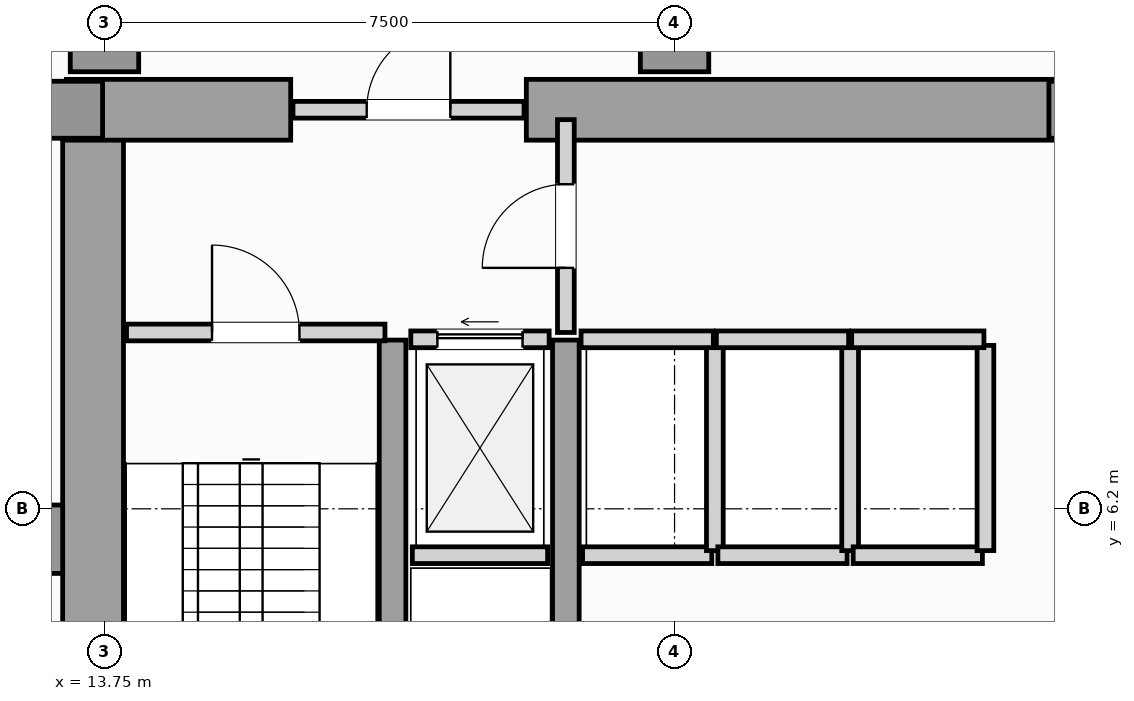
"""IFC4 building model, lengths in metres.
Left out: names, types, materials, properties, quantities, classifications, styles, units other than length and angle.
Written with IfcOpenShell. Run it as: python <this file> out.ifc"""

import sys

from ifc_helpers import new_model, si_unit, direction, frame, frame_2d, origin, origin_2d, place, context, subcontext, project, spatial, rectangle, extrude, element, fill, save


model = new_model("IFC4")
c1 = context("Model", 3, precision=1e-05, world=origin(), true_north=direction((0.0, 1.0)))
c2 = subcontext(c1, "Body", "Model", "MODEL_VIEW")
j1 = project(units=[si_unit("LENGTHUNIT", "METRE"), si_unit("PLANEANGLEUNIT", "RADIAN")], contexts=[c1])
p1 = place(None, origin())
s1 = spatial("IfcSite", under=j1, at=p1, CompositionType="ELEMENT")
p2 = place(p1, origin())
s2 = spatial("IfcBuilding", under=s1, at=p2, CompositionType="ELEMENT")
p3 = place(p2, frame((0.0, 0.0, 15.0)))
s3 = spatial("IfcBuildingStorey", under=s2, at=p3, CompositionType="ELEMENT", Elevation=15.0)
p4 = place(p3, frame((13.6, 0.92, 0.0), z_axis=(0.0, 0.0, 1.0), x_axis=(0.0, 1.0, 0.0)))
e1 = element("IfcWall", 1, at=p4, inside=s3, PredefinedType="SHEAR", context=c2, shape_type="SweptSolid", body=[
    extrude(rectangle(XDim=10.53, YDim=0.8, at=frame_2d((5.265, 0.0))), origin(), (0.0, 0.0, 1.0), 4.5),
])
p5 = place(p3, frame((13.25, 11.45, 0.0), z_axis=(0.0, 0.0, 1.0), x_axis=(1.0, 0.0, 0.0)))
e2 = element("IfcWall", 2, at=p5, inside=s3, PredefinedType="SHEAR", context=c2, shape_type="SweptSolid", body=[
    extrude(rectangle(XDim=2.95, YDim=0.8, at=frame_2d((1.475, 0.0))), origin(), (0.0, 0.0, 1.0), 4.5),
])
p6 = place(p3, frame((19.3, 11.45, 0.0), z_axis=(0.0, 0.0, 1.0), x_axis=(1.0, 0.0, 0.0)))
e3 = element("IfcWall", 3, at=p6, inside=s3, PredefinedType="SHEAR", context=c2, shape_type="SweptSolid", body=[
    extrude(rectangle(XDim=7.3, YDim=0.8, at=frame_2d((3.65, 0.0))), origin(), (0.0, 0.0, 1.0), 4.5),
])
for number, where, z_axis, x_axis in (
    (4, (17.54, 0.92, 0.0), (0.0, 0.0, 1.0), (0.0, 1.0, 0.0)),
    (5, (19.82, 0.92, 0.0), (0.0, 0.0, 1.0), (0.0, 1.0, 0.0)),
):
    element("IfcWall", number, at=place(p3, frame(where, z_axis=z_axis, x_axis=x_axis)), inside=s3, PredefinedType="SHEAR", context=c2, shape_type="SweptSolid", body=[
        extrude(rectangle(XDim=7.5, YDim=0.35, at=frame_2d((3.75, 0.0))), origin(), (0.0, 0.0, 1.0), 4.5),
    ])
p7 = place(p3, frame((12.9, 5.8, 0.0), z_axis=(0.0, 0.0, 1.0), x_axis=(1.0, 0.0, 0.0)))
e6 = element("IfcColumn", 6, at=p7, inside=s3, PredefinedType="PILASTER", context=c2, shape_type="SweptSolid", body=[
    extrude(rectangle(XDim=0.6, YDim=0.9, at=origin_2d()), origin(), (0.0, 0.0, 1.0), 4.8),
])
for number, where, z_axis, x_axis in (
    (7, (13.35, 11.45, 0.0), (0.0, 0.0, 1.0), (1.0, 0.0, 0.0)),
    (8, (26.55, 11.45, 0.0), (0.0, 0.0, 1.0), (1.0, 0.0, 0.0)),
):
    element("IfcColumn", number, at=place(p3, frame(where, z_axis=z_axis, x_axis=x_axis)), inside=s3, PredefinedType="COLUMN", context=c2, shape_type="SweptSolid", body=[
        extrude(rectangle(XDim=0.75, YDim=0.75, at=origin_2d()), origin(), (0.0, 0.0, 1.0), 4.8),
    ])
for number, where, z_axis, x_axis in (
    (9, (13.75, 12.4, 0.0), (0.0, 0.0, 1.0), (1.0, 0.0, 0.0)),
    (10, (21.25, 12.4, 0.0), (0.0, 0.0, 1.0), (1.0, 0.0, 0.0)),
):
    element("IfcColumn", number, at=place(p3, frame(where, z_axis=z_axis, x_axis=x_axis)), inside=s3, PredefinedType="COLUMN", context=c2, shape_type="SweptSolid", body=[
        extrude(rectangle(XDim=0.9, YDim=0.9, at=origin_2d()), origin(), (0.0, 0.0, 1.0), 4.8),
    ])
p8 = place(p3, frame((17.8, 5.59, 0.0), z_axis=(0.0, 0.0, 1.0), x_axis=(1.0, 0.0, 0.0)))
e11 = element("IfcWall", 11, at=p8, inside=s3, PredefinedType="SOLIDWALL", context=c2, shape_type="SweptSolid", body=[
    extrude(rectangle(XDim=1.78, YDim=0.22, at=frame_2d((0.89, 0.0))), origin(), (0.0, 0.0, 1.0), 4.5),
])
p9 = place(p3, frame((17.78, 8.43, 0.0), z_axis=(0.0, 0.0, 1.0), x_axis=(1.0, 0.0, 0.0)))
e12 = element("IfcWall", 12, at=p9, inside=s3, PredefinedType="SOLIDWALL", context=c2, shape_type="SweptSolid", body=[
    extrude(rectangle(XDim=1.82, YDim=0.22, at=frame_2d((0.91, 0.0))), origin(), (0.0, 0.0, 1.0), 4.5),
])
p10 = place(p9, frame((0.35, 0.0, 0.0)))
e13 = element("IfcOpeningElement", 13, at=p10, cuts=e12, PredefinedType="OPENING", context=c2, shape_type="SweptSolid", body=[
    extrude(rectangle(XDim=1.12, YDim=2.25, at=frame_2d((0.56, 1.125))), frame((0.0, 0.12, 0.0), z_axis=(0.0, -1.0, 0.0), x_axis=(1.0, 0.0, 0.0)), (0.0, 0.0, 1.0), 0.24),
])
p11 = place(p3, frame((20.04, 5.59, 0.0), z_axis=(0.0, 0.0, 1.0), x_axis=(1.0, 0.0, 0.0)))
e14 = element("IfcWall", 14, at=p11, inside=s3, PredefinedType="SOLIDWALL", context=c2, shape_type="SweptSolid", body=[
    extrude(rectangle(XDim=1.7, YDim=0.22, at=frame_2d((0.85, 0.0))), origin(), (0.0, 0.0, 1.0), 4.5),
])
p12 = place(p3, frame((21.78, 5.65, 0.0), z_axis=(0.0, 0.0, 1.0), x_axis=(0.0, 1.0, 0.0)))
e15 = element("IfcWall", 15, at=p12, inside=s3, PredefinedType="SOLIDWALL", context=c2, shape_type="SweptSolid", body=[
    extrude(rectangle(XDim=2.7, YDim=0.22, at=frame_2d((1.35, 0.0))), origin(), (0.0, 0.0, 1.0), 4.5),
])
p13 = place(p3, frame((20.02, 8.43, 0.0), z_axis=(0.0, 0.0, 1.0), x_axis=(1.0, 0.0, 0.0)))
e16 = element("IfcWall", 16, at=p13, inside=s3, PredefinedType="SOLIDWALL", context=c2, shape_type="SweptSolid", body=[
    extrude(rectangle(XDim=1.74, YDim=0.22, at=frame_2d((0.87, 0.0))), origin(), (0.0, 0.0, 1.0), 4.5),
])
p14 = place(p3, frame((21.82, 5.59, 0.0), z_axis=(0.0, 0.0, 1.0), x_axis=(1.0, 0.0, 0.0)))
e17 = element("IfcWall", 17, at=p14, inside=s3, PredefinedType="SOLIDWALL", context=c2, shape_type="SweptSolid", body=[
    extrude(rectangle(XDim=1.7, YDim=0.22, at=frame_2d((0.85, 0.0))), origin(), (0.0, 0.0, 1.0), 4.5),
])
p15 = place(p3, frame((23.56, 5.65, 0.0), z_axis=(0.0, 0.0, 1.0), x_axis=(0.0, 1.0, 0.0)))
e18 = element("IfcWall", 18, at=p15, inside=s3, PredefinedType="SOLIDWALL", context=c2, shape_type="SweptSolid", body=[
    extrude(rectangle(XDim=2.7, YDim=0.22, at=frame_2d((1.35, 0.0))), origin(), (0.0, 0.0, 1.0), 4.5),
])
p16 = place(p3, frame((21.8, 8.43, 0.0), z_axis=(0.0, 0.0, 1.0), x_axis=(1.0, 0.0, 0.0)))
e19 = element("IfcWall", 19, at=p16, inside=s3, PredefinedType="SOLIDWALL", context=c2, shape_type="SweptSolid", body=[
    extrude(rectangle(XDim=1.74, YDim=0.22, at=frame_2d((0.87, 0.0))), origin(), (0.0, 0.0, 1.0), 4.5),
])
p17 = place(p3, frame((23.6, 5.59, 0.0), z_axis=(0.0, 0.0, 1.0), x_axis=(1.0, 0.0, 0.0)))
e20 = element("IfcWall", 20, at=p17, inside=s3, PredefinedType="SOLIDWALL", context=c2, shape_type="SweptSolid", body=[
    extrude(rectangle(XDim=1.7, YDim=0.22, at=frame_2d((0.85, 0.0))), origin(), (0.0, 0.0, 1.0), 4.5),
])
p18 = place(p3, frame((25.34, 5.65, 0.0), z_axis=(0.0, 0.0, 1.0), x_axis=(0.0, 1.0, 0.0)))
e21 = element("IfcWall", 21, at=p18, inside=s3, PredefinedType="SOLIDWALL", context=c2, shape_type="SweptSolid", body=[
    extrude(rectangle(XDim=2.7, YDim=0.22, at=frame_2d((1.35, 0.0))), origin(), (0.0, 0.0, 1.0), 4.5),
])
p19 = place(p3, frame((23.58, 8.43, 0.0), z_axis=(0.0, 0.0, 1.0), x_axis=(1.0, 0.0, 0.0)))
e22 = element("IfcWall", 22, at=p19, inside=s3, PredefinedType="SOLIDWALL", context=c2, shape_type="SweptSolid", body=[
    extrude(rectangle(XDim=1.74, YDim=0.22, at=frame_2d((0.87, 0.0))), origin(), (0.0, 0.0, 1.0), 4.5),
])
p20 = place(p3, frame((14.04, 8.52, 0.0), z_axis=(0.0, 0.0, 1.0), x_axis=(1.0, 0.0, 0.0)))
e23 = element("IfcWall", 23, at=p20, inside=s3, PredefinedType="SOLIDWALL", context=c2, shape_type="SweptSolid", body=[
    extrude(rectangle(XDim=3.4, YDim=0.22, at=frame_2d((1.7, 0.0))), origin(), (0.0, 0.0, 1.0), 4.5),
])
p21 = place(p20, frame((1.125, 0.0, 0.0)))
e24 = element("IfcOpeningElement", 24, at=p21, cuts=e23, PredefinedType="OPENING", context=c2, shape_type="SweptSolid", body=[
    extrude(rectangle(XDim=1.15, YDim=2.2, at=frame_2d((0.575, 1.1))), frame((0.0, 0.12, 0.0), z_axis=(0.0, -1.0, 0.0), x_axis=(1.0, 0.0, 0.0)), (0.0, 0.0, 1.0), 0.24),
])
p22 = place(p3, frame((19.82, 8.52, 0.0), z_axis=(0.0, 0.0, 1.0), x_axis=(0.0, 1.0, 0.0)))
e25 = element("IfcWall", 25, at=p22, inside=s3, PredefinedType="SOLIDWALL", context=c2, shape_type="SweptSolid", body=[
    extrude(rectangle(XDim=2.8, YDim=0.22, at=frame_2d((1.4, 0.0))), origin(), (0.0, 0.0, 1.0), 3.956),
])
p23 = place(p22, frame((0.85, 0.0, 0.0)))
e26 = element("IfcOpeningElement", 26, at=p23, cuts=e25, PredefinedType="OPENING", context=c2, shape_type="SweptSolid", body=[
    extrude(rectangle(XDim=1.1, YDim=2.2, at=frame_2d((0.55, 1.1))), frame((0.0, 0.12, 0.0), z_axis=(0.0, -1.0, 0.0), x_axis=(1.0, 0.0, 0.0)), (0.0, 0.0, 1.0), 0.24),
])
p24 = place(p3, frame((16.23, 11.45, 0.0), z_axis=(0.0, 0.0, 1.0), x_axis=(1.0, 0.0, 0.0)))
e27 = element("IfcWall", 27, at=p24, inside=s3, PredefinedType="SOLIDWALL", context=c2, shape_type="SweptSolid", body=[
    extrude(rectangle(XDim=3.04, YDim=0.22, at=frame_2d((1.52, 0.0))), origin(), (0.0, 0.0, 1.0), 4.5),
])
p25 = place(p24, frame((0.97, 0.0, 0.0)))
e28 = element("IfcOpeningElement", 28, at=p25, cuts=e27, PredefinedType="OPENING", context=c2, shape_type="SweptSolid", body=[
    extrude(rectangle(XDim=1.1, YDim=2.2, at=frame_2d((0.55, 1.1))), frame((0.0, 0.12, 0.0), z_axis=(0.0, -1.0, 0.0), x_axis=(1.0, 0.0, 0.0)), (0.0, 0.0, 1.0), 0.24),
])
p26 = place(p10, origin())
e29 = element("IfcDoor", 29, at=p26, inside=s3, OperationType="SLIDING_TO_LEFT", PredefinedType="DOOR", context=c2, shape_type="SweptSolid", body=[
    extrude(rectangle(XDim=1.12, YDim=2.25, at=frame_2d((0.56, 1.125))), frame((0.0, 0.025, 0.0), z_axis=(0.0, -1.0, 0.0), x_axis=(1.0, 0.0, 0.0)), (0.0, 0.0, 1.0), 0.05),
])
fill(e13, e29)
p27 = place(p21, origin())
e30 = element("IfcDoor", 30, at=p27, inside=s3, OperationType="SINGLE_SWING_LEFT", PredefinedType="DOOR", context=c2, shape_type="SweptSolid", body=[
    extrude(rectangle(XDim=1.15, YDim=2.2, at=frame_2d((0.575, 1.1))), frame((0.0, 0.025, 0.0), z_axis=(0.0, -1.0, 0.0), x_axis=(1.0, 0.0, 0.0)), (0.0, 0.0, 1.0), 0.05),
])
fill(e24, e30)
p28 = place(p23, origin())
e31 = element("IfcDoor", 31, at=p28, inside=s3, OperationType="SINGLE_SWING_LEFT", PredefinedType="DOOR", context=c2, shape_type="SweptSolid", body=[
    extrude(rectangle(XDim=1.1, YDim=2.2, at=frame_2d((0.55, 1.1))), frame((0.0, 0.025, 0.0), z_axis=(0.0, -1.0, 0.0), x_axis=(1.0, 0.0, 0.0)), (0.0, 0.0, 1.0), 0.05),
])
fill(e26, e31)
p29 = place(p25, origin())
e32 = element("IfcDoor", 32, at=p29, inside=s3, OperationType="SINGLE_SWING_RIGHT", PredefinedType="DOOR", context=c2, shape_type="SweptSolid", body=[
    extrude(rectangle(XDim=1.1, YDim=2.2, at=frame_2d((0.55, 1.1))), frame((0.0, 0.025, 0.0), z_axis=(0.0, -1.0, 0.0), x_axis=(1.0, 0.0, 0.0)), (0.0, 0.0, 1.0), 0.05),
])
fill(e28, e32)
save(model, sys.argv[1])
